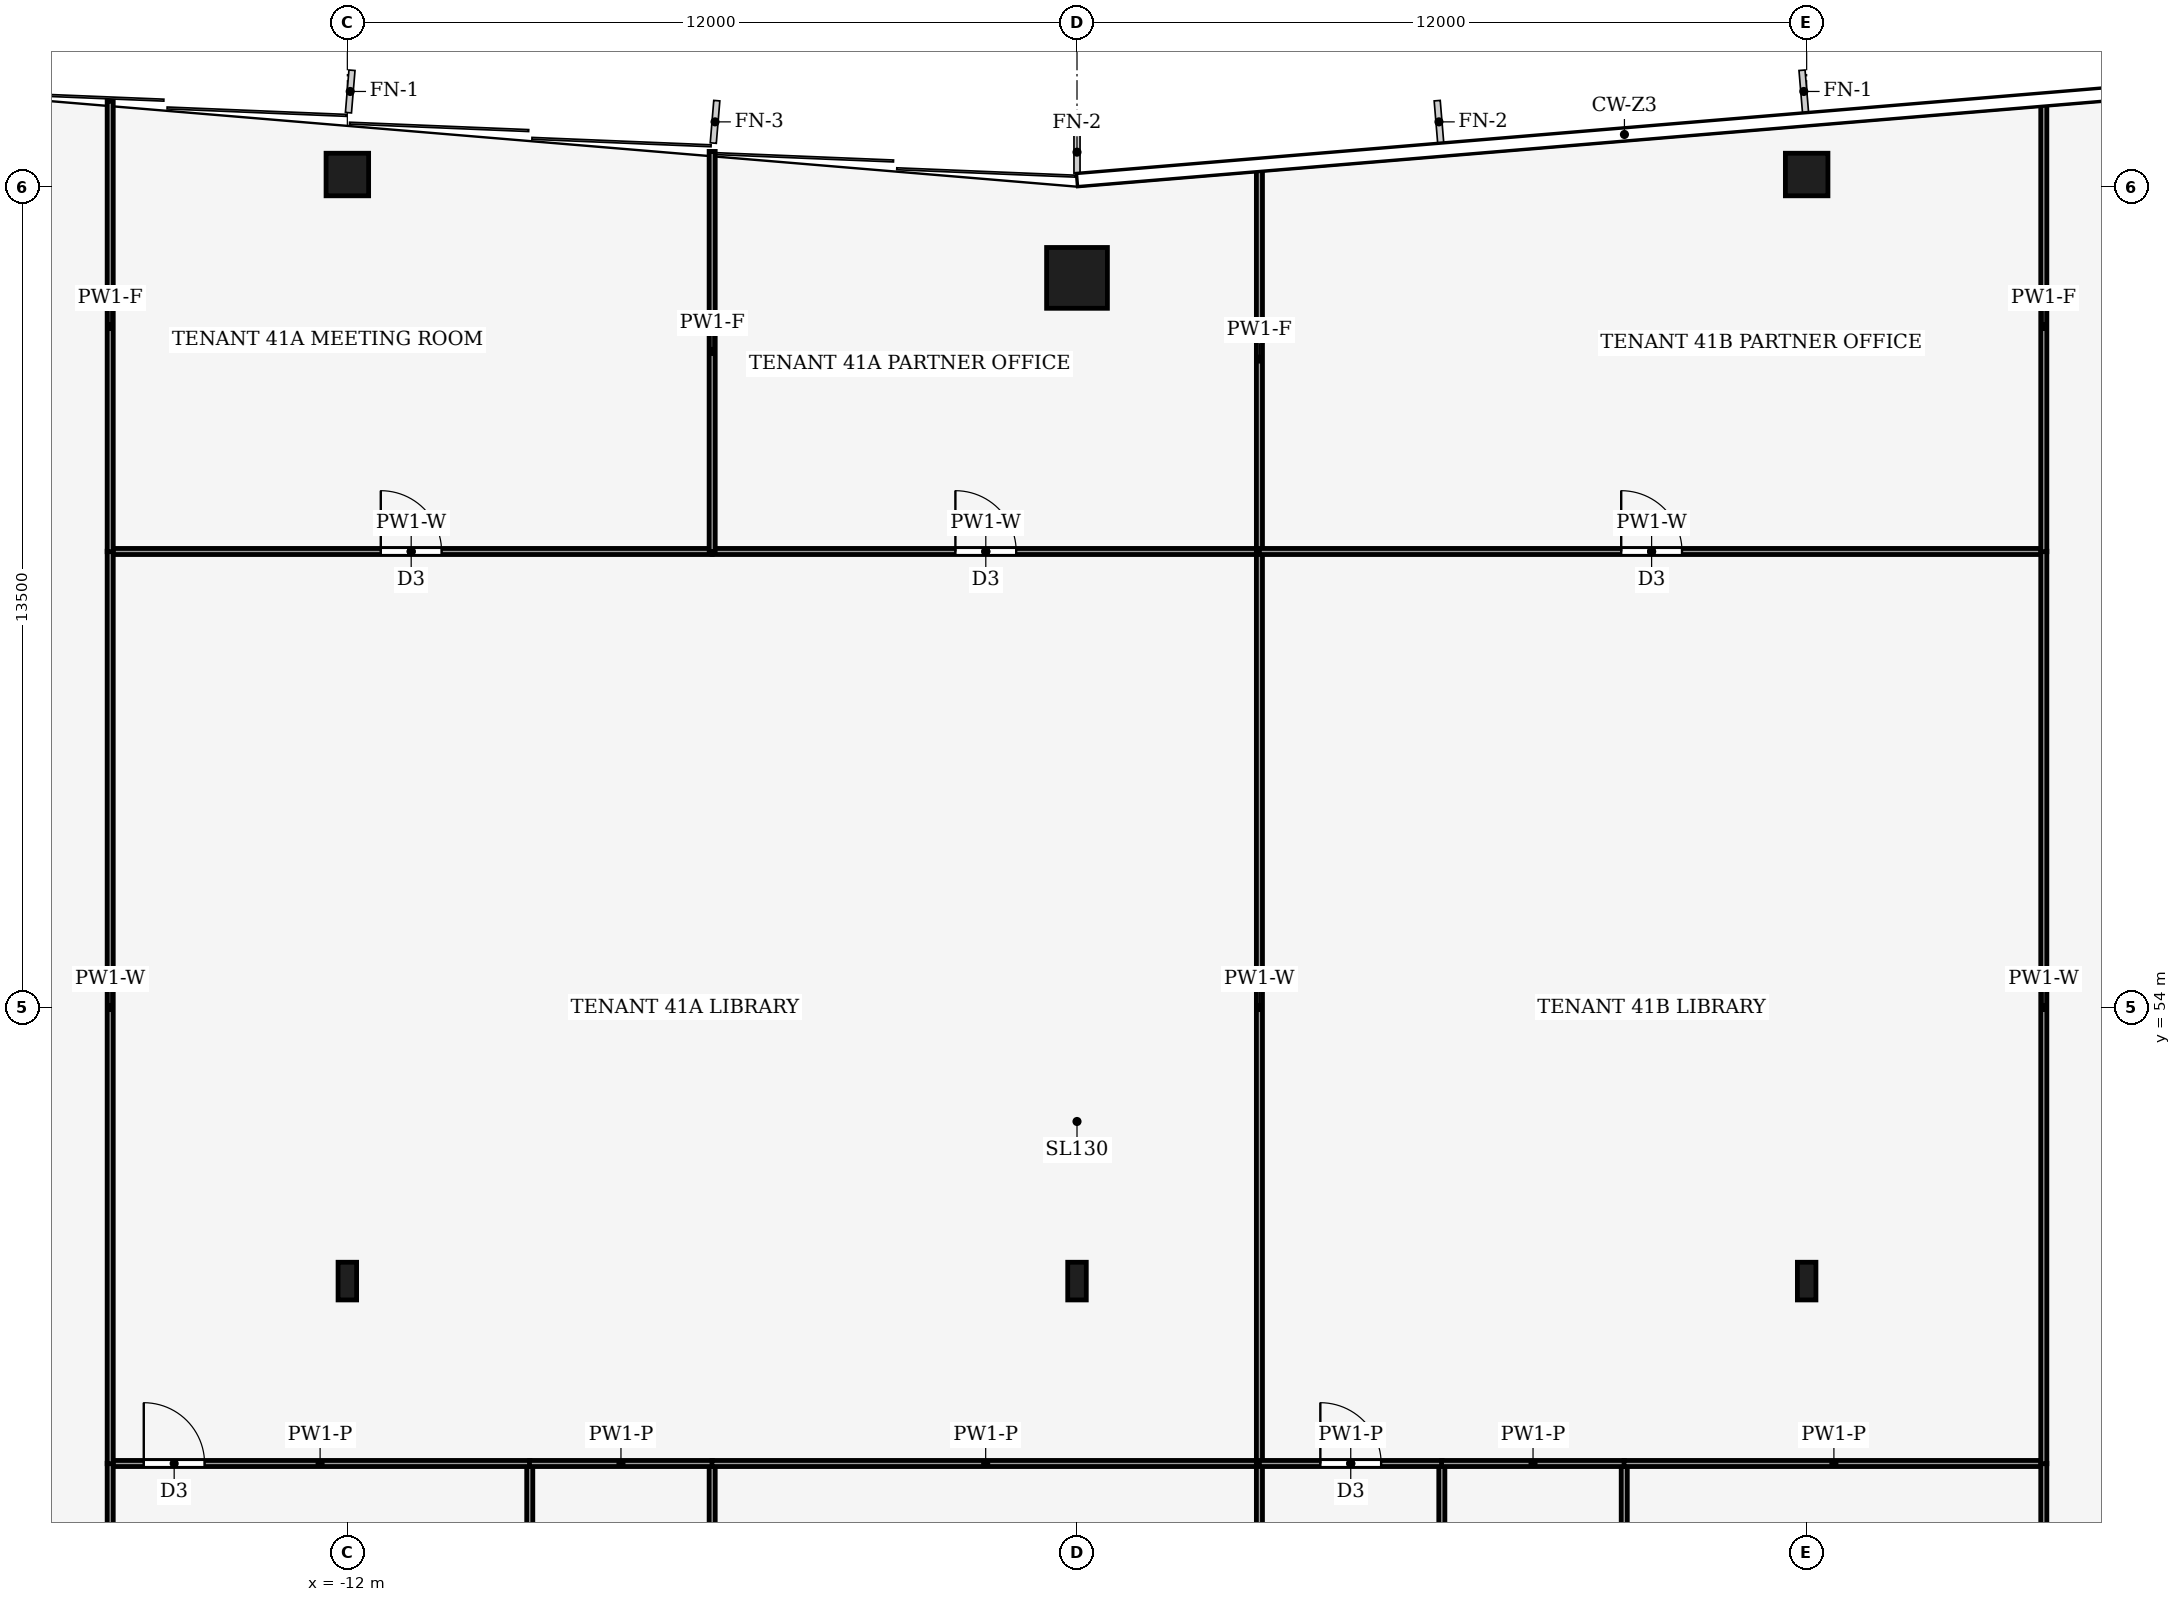
"""IFC4 building model, lengths in metres.
Left out: names, types, materials, properties, quantities, classifications, styles, units other than length and angle.
Written with IfcOpenShell. Run it as: python <this file> out.ifc"""

import sys

from ifc_helpers import new_model, si_unit, direction, frame, frame_2d, origin, origin_2d, place, context, subcontext, project, spatial, rectangle, hollow_rectangle, i_section, extrude, element, fill, save


model = new_model("IFC4")
c1 = context("Model", 3, precision=1e-05, world=origin(), true_north=direction((0.0, 1.0)))
c2 = subcontext(c1, "Body", "Model", "MODEL_VIEW")
j1 = project(units=[si_unit("LENGTHUNIT", "METRE"), si_unit("PLANEANGLEUNIT", "RADIAN")], contexts=[c1])
p1 = place(None, origin())
s1 = spatial("IfcSite", under=j1, at=p1, CompositionType="ELEMENT")
p2 = place(p1, origin())
s2 = spatial("IfcBuilding", under=s1, at=p2, CompositionType="ELEMENT")
p3 = place(p2, frame((0.0, 0.0, 182.0)))
s3 = spatial("IfcBuildingStorey", under=s2, at=p3, CompositionType="ELEMENT", Elevation=182.0)
p4 = place(p3, frame((0.0, 66.0, 0.0), z_axis=(0.0, 0.0, 1.0), x_axis=(1.0, 0.0, 0.0)))
e1 = element("IfcColumn", 1, at=p4, inside=s3, PredefinedType="COLUMN", context=c2, shape_type="SweptSolid", body=[
    extrude(hollow_rectangle(XDim=1.0, YDim=1.0, WallThickness=0.06, at=origin_2d()), origin(), (0.0, 0.0, 1.0), 4.0),
])
for number, where, z_axis, x_axis in (
    (2, (-12.0, 67.7, 0.0), (0.0, 0.0, 1.0), (1.0, 0.0, 0.0)),
    (3, (12.0, 67.7, 0.0), (0.0, 0.0, 1.0), (1.0, 0.0, 0.0)),
):
    element("IfcColumn", number, at=place(p3, frame(where, z_axis=z_axis, x_axis=x_axis)), inside=s3, PredefinedType="COLUMN", context=c2, shape_type="SweptSolid", body=[
        extrude(hollow_rectangle(XDim=0.7, YDim=0.7, WallThickness=0.03, at=origin_2d()), origin(), (0.0, 0.0, 1.0), 4.0),
    ])
for number, where, z_axis, x_axis in (
    (4, (-12.0, 49.5, 0.0), (0.0, 0.0, 1.0), (1.0, 0.0, 0.0)),
    (5, (0.0, 49.5, 0.0), (0.0, 0.0, 1.0), (1.0, 0.0, 0.0)),
    (6, (12.0, 49.5, 0.0), (0.0, 0.0, 1.0), (1.0, 0.0, 0.0)),
):
    element("IfcColumn", number, at=place(p3, frame(where, z_axis=z_axis, x_axis=x_axis)), inside=s3, PredefinedType="COLUMN", context=c2, shape_type="SweptSolid", body=[
        extrude(i_section(OverallWidth=0.305, OverallDepth=0.62, WebThickness=0.021, FlangeThickness=0.04, FilletRadius=0.027, at=origin_2d()), origin(), (0.0, 0.0, 1.0), 4.0),
    ])
p5 = place(p3, frame((-9.0, 46.5, 0.0), z_axis=(0.0, 0.0, 1.0), x_axis=(0.0, -1.0, 0.0)))
e7 = element("IfcWall", 7, at=p5, inside=s3, PredefinedType="PARTITIONING", context=c2, shape_type="SweptSolid", body=[
    extrude(rectangle(XDim=5.6, YDim=0.1, at=frame_2d((2.8, 0.0))), origin(), (0.0, 0.0, 1.0), 3.87),
])
p6 = place(p5, frame((2.3, 0.0, 0.0)))
e8 = element("IfcOpeningElement", 8, at=p6, cuts=e7, PredefinedType="OPENING", context=c2, shape_type="SweptSolid", body=[
    extrude(rectangle(XDim=1.0, YDim=2.1, at=frame_2d((0.5, 1.05))), frame((0.0, 0.06, 0.0), z_axis=(0.0, -1.0, 0.0), x_axis=(1.0, 0.0, 0.0)), (0.0, 0.0, 1.0), 0.12),
])
p7 = place(p3, frame((-15.9, 46.5, 0.0), z_axis=(0.0, 0.0, 1.0), x_axis=(1.0, 0.0, 0.0)))
e9 = element("IfcWall", 9, at=p7, inside=s3, PredefinedType="PARTITIONING", context=c2, shape_type="SweptSolid", body=[
    extrude(rectangle(XDim=6.904, YDim=0.1, at=frame_2d((3.452, 0.0))), origin(), (0.0, 0.0, 1.0), 3.44),
])
p8 = place(p7, frame((0.552, 0.0, 0.0)))
e10 = element("IfcOpeningElement", 10, at=p8, cuts=e9, PredefinedType="OPENING", context=c2, shape_type="SweptSolid", body=[
    extrude(rectangle(XDim=1.0, YDim=2.1, at=frame_2d((0.5, 1.05))), frame((0.0, 0.06, 0.0), z_axis=(0.0, -1.0, 0.0), x_axis=(1.0, 0.0, 0.0)), (0.0, 0.0, 1.0), 0.12),
])
p9 = place(p3, frame((-15.9, 46.504, 0.0), z_axis=(0.0, 0.0, 1.0), x_axis=(0.0, -1.0, 0.0)))
e11 = element("IfcWall", 11, at=p9, inside=s3, PredefinedType="PARTITIONING", context=c2, shape_type="SweptSolid", body=[
    extrude(rectangle(XDim=5.608, YDim=0.1, at=frame_2d((2.804, 0.0))), origin(), (0.0, 0.0, 1.0), 3.44),
])
p10 = place(p3, frame((-6.0, 40.9, 0.0), z_axis=(0.0, 0.0, 1.0), x_axis=(0.0, 1.0, 0.0)))
e12 = element("IfcWall", 12, at=p10, inside=s3, PredefinedType="PARTITIONING", context=c2, shape_type="SweptSolid", body=[
    extrude(rectangle(XDim=5.6, YDim=0.1, at=frame_2d((2.8, 0.0))), origin(), (0.0, 0.0, 1.0), 3.87),
])
p11 = place(p3, frame((-5.996, 46.5, 0.0), z_axis=(0.0, 0.0, 1.0), x_axis=(-1.0, 0.0, 0.0)))
e13 = element("IfcWall", 13, at=p11, inside=s3, PredefinedType="PARTITIONING", context=c2, shape_type="SweptSolid", body=[
    extrude(rectangle(XDim=3.008, YDim=0.1, at=frame_2d((1.504, 0.0))), origin(), (0.0, 0.0, 1.0), 3.44),
])
p12 = place(p3, frame((3.0, 46.5, 0.0), z_axis=(0.0, 0.0, 1.0), x_axis=(-1.0, 0.0, 0.0)))
e14 = element("IfcWall", 14, at=p12, inside=s3, PredefinedType="PARTITIONING", context=c2, shape_type="SweptSolid", body=[
    extrude(rectangle(XDim=9.004, YDim=0.1, at=frame_2d((4.502, 0.0))), origin(), (0.0, 0.0, 1.0), 3.44),
])
p13 = place(p3, frame((3.0, 40.9, 0.0), z_axis=(0.0, 0.0, 1.0), x_axis=(0.0, 1.0, 0.0)))
e15 = element("IfcWall", 15, at=p13, inside=s3, PredefinedType="PARTITIONING", context=c2, shape_type="SweptSolid", body=[
    extrude(rectangle(XDim=5.6, YDim=0.1, at=frame_2d((2.8, 0.0))), origin(), (0.0, 0.0, 1.0), 3.87),
])
p14 = place(p3, frame((-15.9, 61.5, 0.0), z_axis=(0.0, 0.0, 1.0), x_axis=(1.0, 0.0, 0.0)))
e16 = element("IfcWall", 16, at=p14, inside=s3, PredefinedType="PARTITIONING", context=c2, shape_type="SweptSolid", body=[
    extrude(rectangle(XDim=9.9, YDim=0.1, at=frame_2d((4.95, 0.0))), origin(), (0.0, 0.0, 1.0), 3.24),
])
p15 = place(p14, frame((4.45, 0.0, 0.0)))
e17 = element("IfcOpeningElement", 17, at=p15, cuts=e16, PredefinedType="OPENING", context=c2, shape_type="SweptSolid", body=[
    extrude(rectangle(XDim=1.0, YDim=2.1, at=frame_2d((0.5, 1.05))), frame((0.0, 0.06, 0.0), z_axis=(0.0, -1.0, 0.0), x_axis=(1.0, 0.0, 0.0)), (0.0, 0.0, 1.0), 0.12),
])
p16 = place(p3, frame((-6.0, 61.5, 0.0), z_axis=(0.0, 0.0, 1.0), x_axis=(1.0, 0.0, 0.0)))
e18 = element("IfcWall", 18, at=p16, inside=s3, PredefinedType="PARTITIONING", context=c2, shape_type="SweptSolid", body=[
    extrude(rectangle(XDim=9.0, YDim=0.1, at=frame_2d((4.5, 0.0))), origin(), (0.0, 0.0, 1.0), 3.24),
])
p17 = place(p16, frame((4.0, 0.0, 0.0)))
e19 = element("IfcOpeningElement", 19, at=p17, cuts=e18, PredefinedType="OPENING", context=c2, shape_type="SweptSolid", body=[
    extrude(rectangle(XDim=1.0, YDim=2.1, at=frame_2d((0.5, 1.05))), frame((0.0, 0.06, 0.0), z_axis=(0.0, -1.0, 0.0), x_axis=(1.0, 0.0, 0.0)), (0.0, 0.0, 1.0), 0.12),
])
p18 = place(p3, frame((3.0, 46.5, 0.0), z_axis=(0.0, 0.0, 1.0), x_axis=(0.0, 1.0, 0.0)))
e20 = element("IfcWall", 20, at=p18, inside=s3, PredefinedType="PARTITIONING", context=c2, shape_type="SweptSolid", body=[
    extrude(rectangle(XDim=15.0, YDim=0.1, at=frame_2d((7.5, 0.0))), origin(), (0.0, 0.0, 1.0), 3.24),
])
p19 = place(p3, frame((-15.9, 61.504, 0.0), z_axis=(0.0, 0.0, 1.0), x_axis=(0.0, -1.0, 0.0)))
e21 = element("IfcWall", 21, at=p19, inside=s3, PredefinedType="PARTITIONING", context=c2, shape_type="SweptSolid", body=[
    extrude(rectangle(XDim=15.008, YDim=0.1, at=frame_2d((7.504, 0.0))), origin(), (0.0, 0.0, 1.0), 3.24),
])
p20 = place(p3, frame((-6.0, 61.5, 0.0), z_axis=(0.0, 0.0, 1.0), x_axis=(0.0, 1.0, 0.0)))
e22 = element("IfcWall", 22, at=p20, inside=s3, PredefinedType="PARTITIONING", context=c2, shape_type="SweptSolid", body=[
    extrude(rectangle(XDim=6.58, YDim=0.1, at=frame_2d((3.29, 0.0))), origin(), (0.0, 0.0, 1.0), 3.04),
])
p21 = place(p3, frame((-15.9, 68.905, 0.0), z_axis=(0.0, 0.0, 1.0), x_axis=(0.0, -1.0, 0.0)))
e23 = element("IfcWall", 23, at=p21, inside=s3, PredefinedType="PARTITIONING", context=c2, shape_type="SweptSolid", body=[
    extrude(rectangle(XDim=7.409, YDim=0.1, at=frame_2d((3.705, 0.0))), origin(), (0.0, 0.0, 1.0), 3.04),
])
p22 = place(p3, frame((3.0, 61.5, 0.0), z_axis=(0.0, 0.0, 1.0), x_axis=(0.0, 1.0, 0.0)))
e24 = element("IfcWall", 24, at=p22, inside=s3, PredefinedType="PARTITIONING", context=c2, shape_type="SweptSolid", body=[
    extrude(rectangle(XDim=6.33, YDim=0.1, at=frame_2d((3.165, 0.0))), origin(), (0.0, 0.0, 1.0), 3.04),
])
p23 = place(p3, frame((6.0, 46.5, 0.0), z_axis=(0.0, 0.0, 1.0), x_axis=(0.0, -1.0, 0.0)))
e25 = element("IfcWall", 25, at=p23, inside=s3, PredefinedType="PARTITIONING", context=c2, shape_type="SweptSolid", body=[
    extrude(rectangle(XDim=5.6, YDim=0.1, at=frame_2d((2.8, 0.0))), origin(), (0.0, 0.0, 1.0), 3.87),
])
p24 = place(p23, frame((2.3, 0.0, 0.0)))
e26 = element("IfcOpeningElement", 26, at=p24, cuts=e25, PredefinedType="OPENING", context=c2, shape_type="SweptSolid", body=[
    extrude(rectangle(XDim=1.0, YDim=2.1, at=frame_2d((0.5, 1.05))), frame((0.0, 0.06, 0.0), z_axis=(0.0, -1.0, 0.0), x_axis=(1.0, 0.0, 0.0)), (0.0, 0.0, 1.0), 0.12),
])
p25 = place(p3, frame((3.0, 46.5, 0.0), z_axis=(0.0, 0.0, 1.0), x_axis=(1.0, 0.0, 0.0)))
e27 = element("IfcWall", 27, at=p25, inside=s3, PredefinedType="PARTITIONING", context=c2, shape_type="SweptSolid", body=[
    extrude(rectangle(XDim=3.004, YDim=0.1, at=frame_2d((1.502, 0.0))), origin(), (0.0, 0.0, 1.0), 3.44),
])
p26 = place(p25, frame((1.002, 0.0, 0.0)))
e28 = element("IfcOpeningElement", 28, at=p26, cuts=e27, PredefinedType="OPENING", context=c2, shape_type="SweptSolid", body=[
    extrude(rectangle(XDim=1.0, YDim=2.1, at=frame_2d((0.5, 1.05))), frame((0.0, 0.06, 0.0), z_axis=(0.0, -1.0, 0.0), x_axis=(1.0, 0.0, 0.0)), (0.0, 0.0, 1.0), 0.12),
])
p27 = place(p3, frame((9.0, 40.9, 0.0), z_axis=(0.0, 0.0, 1.0), x_axis=(0.0, 1.0, 0.0)))
e29 = element("IfcWall", 29, at=p27, inside=s3, PredefinedType="PARTITIONING", context=c2, shape_type="SweptSolid", body=[
    extrude(rectangle(XDim=5.6, YDim=0.1, at=frame_2d((2.8, 0.0))), origin(), (0.0, 0.0, 1.0), 3.87),
])
p28 = place(p3, frame((9.004, 46.5, 0.0), z_axis=(0.0, 0.0, 1.0), x_axis=(-1.0, 0.0, 0.0)))
e30 = element("IfcWall", 30, at=p28, inside=s3, PredefinedType="PARTITIONING", context=c2, shape_type="SweptSolid", body=[
    extrude(rectangle(XDim=3.008, YDim=0.1, at=frame_2d((1.504, 0.0))), origin(), (0.0, 0.0, 1.0), 3.44),
])
p29 = place(p3, frame((15.9, 46.5, 0.0), z_axis=(0.0, 0.0, 1.0), x_axis=(-1.0, 0.0, 0.0)))
e31 = element("IfcWall", 31, at=p29, inside=s3, PredefinedType="PARTITIONING", context=c2, shape_type="SweptSolid", body=[
    extrude(rectangle(XDim=6.904, YDim=0.1, at=frame_2d((3.452, 0.0))), origin(), (0.0, 0.0, 1.0), 3.44),
])
p30 = place(p3, frame((15.9, 40.896, 0.0), z_axis=(0.0, 0.0, 1.0), x_axis=(0.0, 1.0, 0.0)))
e32 = element("IfcWall", 32, at=p30, inside=s3, PredefinedType="PARTITIONING", context=c2, shape_type="SweptSolid", body=[
    extrude(rectangle(XDim=5.608, YDim=0.1, at=frame_2d((2.804, 0.0))), origin(), (0.0, 0.0, 1.0), 3.44),
])
p31 = place(p3, frame((3.0, 61.5, 0.0), z_axis=(0.0, 0.0, 1.0), x_axis=(1.0, 0.0, 0.0)))
e33 = element("IfcWall", 33, at=p31, inside=s3, PredefinedType="PARTITIONING", context=c2, shape_type="SweptSolid", body=[
    extrude(rectangle(XDim=12.9, YDim=0.1, at=frame_2d((6.45, 0.0))), origin(), (0.0, 0.0, 1.0), 3.24),
])
p32 = place(p31, frame((5.95, 0.0, 0.0)))
e34 = element("IfcOpeningElement", 34, at=p32, cuts=e33, PredefinedType="OPENING", context=c2, shape_type="SweptSolid", body=[
    extrude(rectangle(XDim=1.0, YDim=2.1, at=frame_2d((0.5, 1.05))), frame((0.0, 0.06, 0.0), z_axis=(0.0, -1.0, 0.0), x_axis=(1.0, 0.0, 0.0)), (0.0, 0.0, 1.0), 0.12),
])
p33 = place(p3, frame((15.9, 46.496, 0.0), z_axis=(0.0, 0.0, 1.0), x_axis=(0.0, 1.0, 0.0)))
e35 = element("IfcWall", 35, at=p33, inside=s3, PredefinedType="PARTITIONING", context=c2, shape_type="SweptSolid", body=[
    extrude(rectangle(XDim=15.008, YDim=0.1, at=frame_2d((7.504, 0.0))), origin(), (0.0, 0.0, 1.0), 3.24),
])
p34 = place(p3, frame((15.9, 61.496, 0.0), z_axis=(0.0, 0.0, 1.0), x_axis=(0.0, 1.0, 0.0)))
e36 = element("IfcWall", 36, at=p34, inside=s3, PredefinedType="PARTITIONING", context=c2, shape_type="SweptSolid", body=[
    extrude(rectangle(XDim=7.409, YDim=0.1, at=frame_2d((3.705, 0.0))), origin(), (0.0, 0.0, 1.0), 3.04),
])
p35 = place(p8, origin())
e37 = element("IfcDoor", 37, at=p35, inside=s3, OperationType="SINGLE_SWING_LEFT", PredefinedType="DOOR", context=c2, shape_type="SweptSolid", body=[
    extrude(rectangle(XDim=1.0, YDim=2.1, at=frame_2d((0.5, 1.05))), frame((0.0, 0.025, 0.0), z_axis=(0.0, -1.0, 0.0), x_axis=(1.0, 0.0, 0.0)), (0.0, 0.0, 1.0), 0.05),
])
fill(e10, e37)
p36 = place(p15, origin())
e38 = element("IfcDoor", 38, at=p36, inside=s3, OperationType="SINGLE_SWING_RIGHT", PredefinedType="DOOR", context=c2, shape_type="SweptSolid", body=[
    extrude(rectangle(XDim=1.0, YDim=2.1, at=frame_2d((0.5, 1.05))), frame((0.0, 0.025, 0.0), z_axis=(0.0, -1.0, 0.0), x_axis=(1.0, 0.0, 0.0)), (0.0, 0.0, 1.0), 0.05),
])
fill(e17, e38)
p37 = place(p17, origin())
e39 = element("IfcDoor", 39, at=p37, inside=s3, OperationType="SINGLE_SWING_LEFT", PredefinedType="DOOR", context=c2, shape_type="SweptSolid", body=[
    extrude(rectangle(XDim=1.0, YDim=2.1, at=frame_2d((0.5, 1.05))), frame((0.0, 0.025, 0.0), z_axis=(0.0, -1.0, 0.0), x_axis=(1.0, 0.0, 0.0)), (0.0, 0.0, 1.0), 0.05),
])
fill(e19, e39)
p38 = place(p26, origin())
e40 = element("IfcDoor", 40, at=p38, inside=s3, OperationType="SINGLE_SWING_LEFT", PredefinedType="DOOR", context=c2, shape_type="SweptSolid", body=[
    extrude(rectangle(XDim=1.0, YDim=2.1, at=frame_2d((0.5, 1.05))), frame((0.0, 0.025, 0.0), z_axis=(0.0, -1.0, 0.0), x_axis=(1.0, 0.0, 0.0)), (0.0, 0.0, 1.0), 0.05),
])
fill(e28, e40)
p39 = place(p32, origin())
e41 = element("IfcDoor", 41, at=p39, inside=s3, OperationType="SINGLE_SWING_RIGHT", PredefinedType="DOOR", context=c2, shape_type="SweptSolid", body=[
    extrude(rectangle(XDim=1.0, YDim=2.1, at=frame_2d((0.5, 1.05))), frame((0.0, 0.025, 0.0), z_axis=(0.0, -1.0, 0.0), x_axis=(1.0, 0.0, 0.0)), (0.0, 0.0, 1.0), 0.05),
])
fill(e34, e41)
save(model, sys.argv[1])
